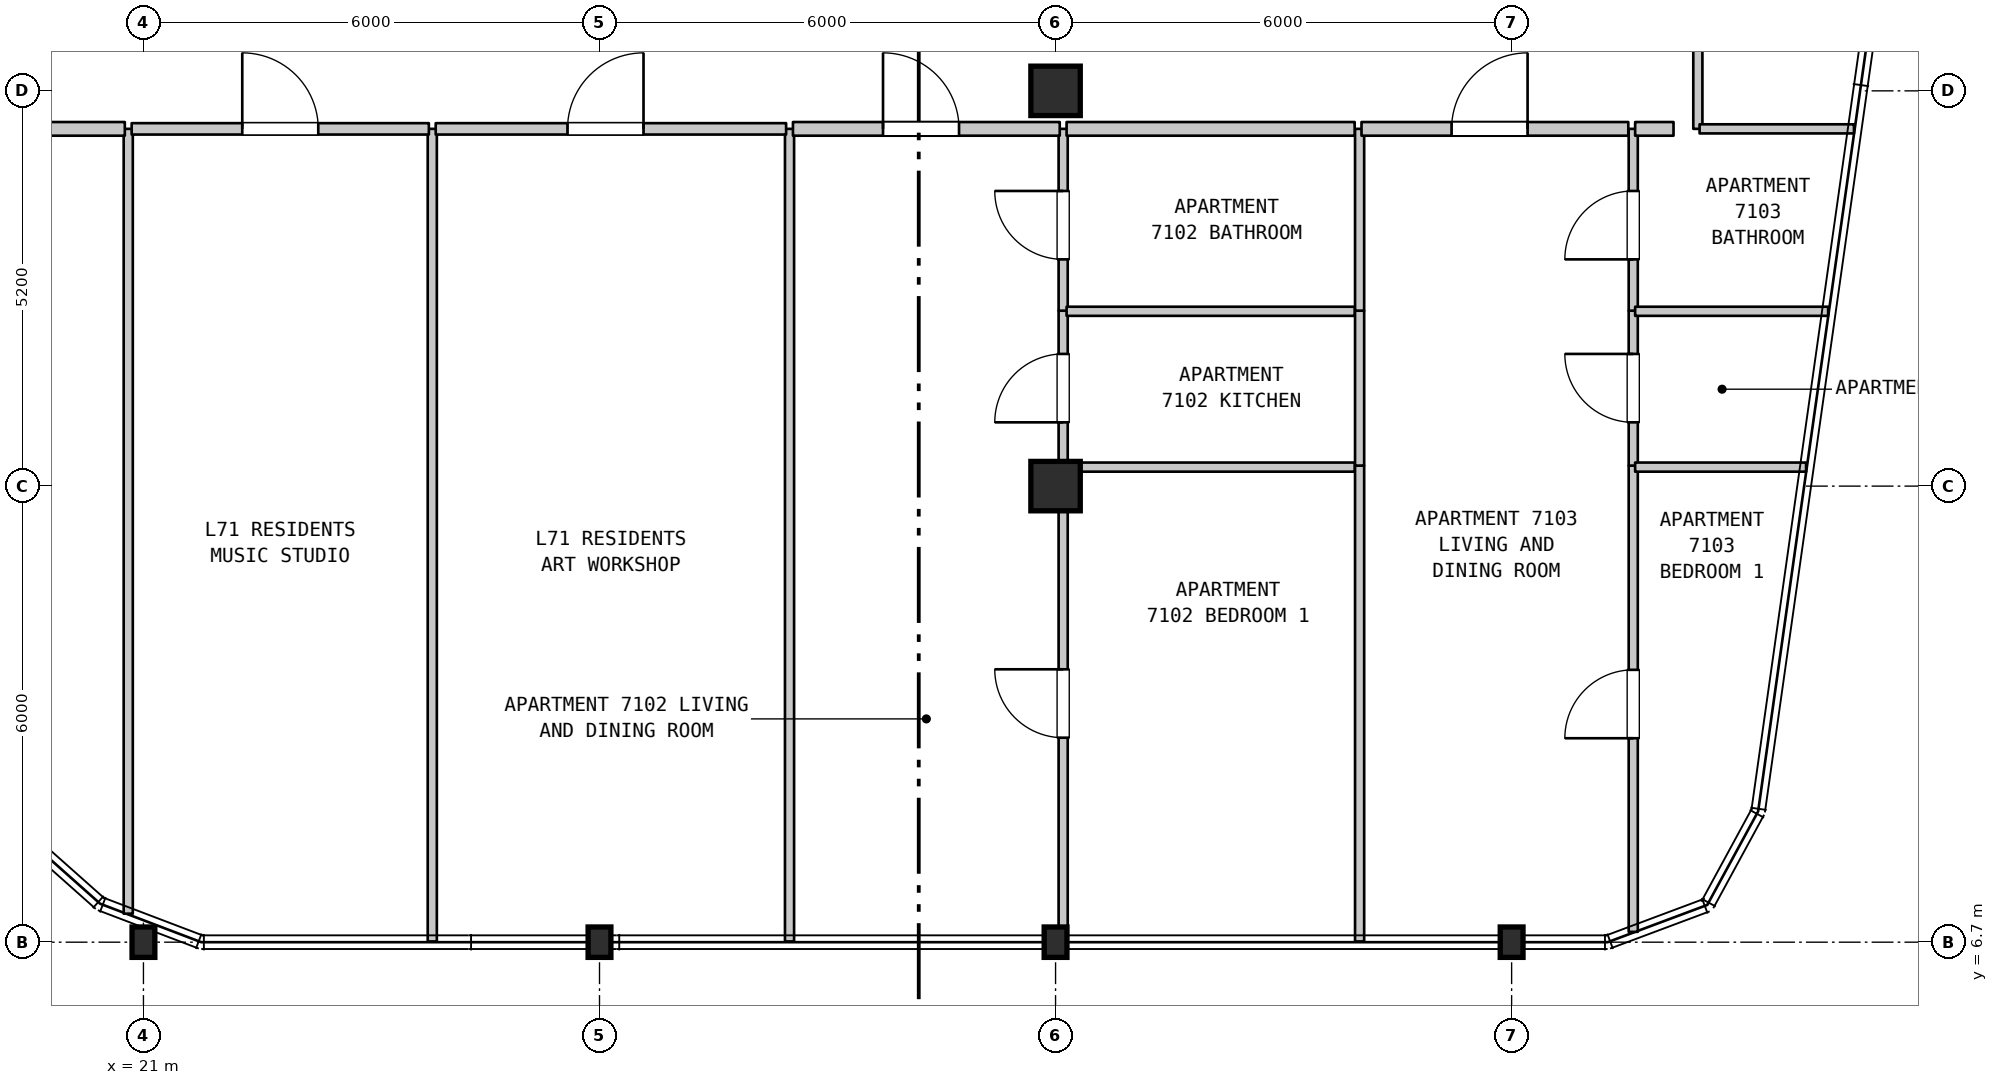
"""IFC4 building model, lengths in metres.
Left out: names, types, materials, properties, quantities, classifications, styles, units other than length and angle.
Written with IfcOpenShell. Run it as: python <this file> out.ifc"""

import sys

from ifc_helpers import new_model, si_unit, direction, frame, frame_2d, origin, origin_2d, place, context, subcontext, project, spatial, rectangle, i_section, extrude, element, fill, save


model = new_model("IFC4")
c1 = context("Model", 3, precision=1e-05, world=origin(), true_north=direction((0.0, 1.0)))
c2 = subcontext(c1, "Body", "Model", "MODEL_VIEW")
j1 = project(units=[si_unit("LENGTHUNIT", "METRE"), si_unit("PLANEANGLEUNIT", "RADIAN")], contexts=[c1])
p1 = place(None, origin())
s1 = spatial("IfcSite", under=j1, at=p1, CompositionType="ELEMENT")
p2 = place(p1, origin())
s2 = spatial("IfcBuilding", under=s1, at=p2, CompositionType="ELEMENT")
p3 = place(p2, frame((0.0, 0.0, 284.3)))
s3 = spatial("IfcBuildingStorey", under=s2, at=p3, CompositionType="ELEMENT", Elevation=284.3)
for number, where, z_axis, x_axis in (
    (1, (21.0, 6.7, 0.0), (0.0, 0.0, 1.0), (1.0, 0.0, 0.0)),
    (2, (27.0, 6.7, 0.0), (0.0, 0.0, 1.0), (1.0, 0.0, 0.0)),
    (3, (33.0, 6.7, 0.0), (0.0, 0.0, 1.0), (1.0, 0.0, 0.0)),
):
    element("IfcColumn", number, at=place(p3, frame(where, z_axis=z_axis, x_axis=x_axis)), inside=s3, PredefinedType="COLUMN", context=c2, shape_type="SweptSolid", body=[
        extrude(i_section(OverallWidth=0.3, OverallDepth=0.4, WebThickness=0.013, FlangeThickness=0.024, FilletRadius=0.027, at=origin_2d()), origin(), (0.0, 0.0, 1.0), 3.7),
    ])
for number, where, z_axis, x_axis in (
    (4, (33.0, 12.7, 0.0), (0.0, 0.0, 1.0), (1.0, 0.0, 0.0)),
    (5, (33.0, 17.9, 0.0), (0.0, 0.0, 1.0), (1.0, 0.0, 0.0)),
):
    element("IfcColumn", number, at=place(p3, frame(where, z_axis=z_axis, x_axis=x_axis)), inside=s3, PredefinedType="COLUMN", context=c2, shape_type="SweptSolid", body=[
        extrude(rectangle(XDim=0.65, YDim=0.65, at=origin_2d()), origin(), (0.0, 0.0, 1.0), 3.7),
    ])
p4 = place(p3, frame((39.0, 6.7, 0.0), z_axis=(0.0, 0.0, 1.0), x_axis=(1.0, 0.0, 0.0)))
e6 = element("IfcColumn", 6, at=p4, inside=s3, PredefinedType="COLUMN", context=c2, shape_type="SweptSolid", body=[
    extrude(i_section(OverallWidth=0.3, OverallDepth=0.4, WebThickness=0.013, FlangeThickness=0.024, FilletRadius=0.027, at=origin_2d()), origin(), (0.0, 0.0, 1.0), 3.7),
])
p5 = place(p3, frame((20.8, 7.075, 0.0), z_axis=(0.0, 0.0, 1.0), x_axis=(0.0, 1.0, 0.0)))
e7 = element("IfcWall", 7, at=p5, inside=s3, PredefinedType="PARTITIONING", context=c2, shape_type="SweptSolid", body=[
    extrude(rectangle(XDim=10.325, YDim=0.12, at=frame_2d((5.163, 0.0))), origin(), (0.0, 0.0, 1.0), 3.39),
])
for number, where, z_axis, x_axis in (
    (8, (24.8, 6.71, 0.0), (0.0, 0.0, 1.0), (0.0, 1.0, 0.0)),
    (9, (29.5, 6.71, 0.0), (0.0, 0.0, 1.0), (0.0, 1.0, 0.0)),
):
    element("IfcWall", number, at=place(p3, frame(where, z_axis=z_axis, x_axis=x_axis)), inside=s3, PredefinedType="PARTITIONING", context=c2, shape_type="SweptSolid", body=[
        extrude(rectangle(XDim=10.69, YDim=0.12, at=frame_2d((5.345, 0.0))), origin(), (0.0, 0.0, 1.0), 3.39),
    ])
p6 = place(p3, frame((33.1, 6.71, 0.0), z_axis=(0.0, 0.0, 1.0), x_axis=(0.0, 1.0, 0.0)))
e10 = element("IfcWall", 10, at=p6, inside=s3, PredefinedType="PARTITIONING", context=c2, shape_type="SweptSolid", body=[
    extrude(rectangle(XDim=6.26, YDim=0.12, at=frame_2d((3.13, 0.0))), origin(), (0.0, 0.0, 1.0), 3.1),
])
p7 = place(p6, frame((2.68, 0.0, 0.0)))
e11 = element("IfcOpeningElement", 11, at=p7, cuts=e10, PredefinedType="OPENING", context=c2, shape_type="SweptSolid", body=[
    extrude(rectangle(XDim=0.9, YDim=2.15, at=frame_2d((0.45, 1.075))), frame((0.0, 0.07, 0.0), z_axis=(0.0, -1.0, 0.0), x_axis=(1.0, 0.0, 0.0)), (0.0, 0.0, 1.0), 0.14),
])
p8 = place(p3, frame((33.1, 12.97, 0.0), z_axis=(0.0, 0.0, 1.0), x_axis=(0.0, 1.0, 0.0)))
e12 = element("IfcWall", 12, at=p8, inside=s3, PredefinedType="PARTITIONING", context=c2, shape_type="SweptSolid", body=[
    extrude(rectangle(XDim=2.038, YDim=0.12, at=frame_2d((1.019, 0.0))), origin(), (0.0, 0.0, 1.0), 3.1),
])
p9 = place(p8, frame((0.569, 0.0, 0.0)))
e13 = element("IfcOpeningElement", 13, at=p9, cuts=e12, PredefinedType="OPENING", context=c2, shape_type="SweptSolid", body=[
    extrude(rectangle(XDim=0.9, YDim=2.15, at=frame_2d((0.45, 1.075))), frame((0.0, 0.07, 0.0), z_axis=(0.0, -1.0, 0.0), x_axis=(1.0, 0.0, 0.0)), (0.0, 0.0, 1.0), 0.14),
])
p10 = place(p3, frame((33.1, 15.008, 0.0), z_axis=(0.0, 0.0, 1.0), x_axis=(0.0, 1.0, 0.0)))
e14 = element("IfcWall", 14, at=p10, inside=s3, PredefinedType="PARTITIONING", context=c2, shape_type="SweptSolid", body=[
    extrude(rectangle(XDim=2.392, YDim=0.12, at=frame_2d((1.196, 0.0))), origin(), (0.0, 0.0, 1.0), 3.1),
])
p11 = place(p10, frame((0.675, 0.0, 0.0)))
e15 = element("IfcOpeningElement", 15, at=p11, cuts=e14, PredefinedType="OPENING", context=c2, shape_type="SweptSolid", body=[
    extrude(rectangle(XDim=0.9, YDim=2.1, at=frame_2d((0.45, 1.05))), frame((0.0, 0.07, 0.0), z_axis=(0.0, -1.0, 0.0), x_axis=(1.0, 0.0, 0.0)), (0.0, 0.0, 1.0), 0.14),
])
p12 = place(p3, frame((37.0, 6.71, 0.0), z_axis=(0.0, 0.0, 1.0), x_axis=(0.0, 1.0, 0.0)))
e16 = element("IfcWall", 16, at=p12, inside=s3, PredefinedType="PARTITIONING", context=c2, shape_type="SweptSolid", body=[
    extrude(rectangle(XDim=6.26, YDim=0.12, at=frame_2d((3.13, 0.0))), origin(), (0.0, 0.0, 1.0), 3.39),
])
p13 = place(p3, frame((37.0, 12.97, 0.0), z_axis=(0.0, 0.0, 1.0), x_axis=(0.0, 1.0, 0.0)))
e17 = element("IfcWall", 17, at=p13, inside=s3, PredefinedType="PARTITIONING", context=c2, shape_type="SweptSolid", body=[
    extrude(rectangle(XDim=2.038, YDim=0.12, at=frame_2d((1.019, 0.0))), origin(), (0.0, 0.0, 1.0), 3.39),
])
p14 = place(p3, frame((37.0, 15.008, 0.0), z_axis=(0.0, 0.0, 1.0), x_axis=(0.0, 1.0, 0.0)))
e18 = element("IfcWall", 18, at=p14, inside=s3, PredefinedType="PARTITIONING", context=c2, shape_type="SweptSolid", body=[
    extrude(rectangle(XDim=2.392, YDim=0.12, at=frame_2d((1.196, 0.0))), origin(), (0.0, 0.0, 1.0), 3.39),
])
p15 = place(p3, frame((40.6, 6.836, 0.0), z_axis=(0.0, 0.0, 1.0), x_axis=(0.0, 1.0, 0.0)))
e19 = element("IfcWall", 19, at=p15, inside=s3, PredefinedType="PARTITIONING", context=c2, shape_type="SweptSolid", body=[
    extrude(rectangle(XDim=6.134, YDim=0.12, at=frame_2d((3.067, 0.0))), origin(), (0.0, 0.0, 1.0), 3.39),
])
p16 = place(p15, frame((2.547, 0.0, 0.0)))
e20 = element("IfcOpeningElement", 20, at=p16, cuts=e19, PredefinedType="OPENING", context=c2, shape_type="SweptSolid", body=[
    extrude(rectangle(XDim=0.9, YDim=2.15, at=frame_2d((0.45, 1.075))), frame((0.0, 0.07, 0.0), z_axis=(0.0, -1.0, 0.0), x_axis=(1.0, 0.0, 0.0)), (0.0, 0.0, 1.0), 0.14),
])
p17 = place(p3, frame((40.6, 12.97, 0.0), z_axis=(0.0, 0.0, 1.0), x_axis=(0.0, 1.0, 0.0)))
e21 = element("IfcWall", 21, at=p17, inside=s3, PredefinedType="PARTITIONING", context=c2, shape_type="SweptSolid", body=[
    extrude(rectangle(XDim=2.038, YDim=0.12, at=frame_2d((1.019, 0.0))), origin(), (0.0, 0.0, 1.0), 3.39),
])
p18 = place(p17, frame((0.569, 0.0, 0.0)))
e22 = element("IfcOpeningElement", 22, at=p18, cuts=e21, PredefinedType="OPENING", context=c2, shape_type="SweptSolid", body=[
    extrude(rectangle(XDim=0.9, YDim=2.15, at=frame_2d((0.45, 1.075))), frame((0.0, 0.07, 0.0), z_axis=(0.0, -1.0, 0.0), x_axis=(1.0, 0.0, 0.0)), (0.0, 0.0, 1.0), 0.14),
])
p19 = place(p3, frame((40.6, 15.008, 0.0), z_axis=(0.0, 0.0, 1.0), x_axis=(0.0, 1.0, 0.0)))
e23 = element("IfcWall", 23, at=p19, inside=s3, PredefinedType="PARTITIONING", context=c2, shape_type="SweptSolid", body=[
    extrude(rectangle(XDim=2.392, YDim=0.12, at=frame_2d((1.196, 0.0))), origin(), (0.0, 0.0, 1.0), 3.39),
])
p20 = place(p19, frame((0.675, 0.0, 0.0)))
e24 = element("IfcOpeningElement", 24, at=p20, cuts=e23, PredefinedType="OPENING", context=c2, shape_type="SweptSolid", body=[
    extrude(rectangle(XDim=0.9, YDim=2.1, at=frame_2d((0.45, 1.05))), frame((0.0, 0.07, 0.0), z_axis=(0.0, -1.0, 0.0), x_axis=(1.0, 0.0, 0.0)), (0.0, 0.0, 1.0), 0.14),
])
p21 = place(p3, frame((41.45, 17.4, 0.0), z_axis=(0.0, 0.0, 1.0), x_axis=(0.0, 1.0, 0.0)))
e25 = element("IfcWall", 25, at=p21, inside=s3, PredefinedType="PARTITIONING", context=c2, shape_type="SweptSolid", body=[
    extrude(rectangle(XDim=2.099, YDim=0.12, at=frame_2d((1.05, 0.0))), origin(), (0.0, 0.0, 1.0), 3.39),
])
p22 = place(p3, frame((33.145, 12.95, 0.0), z_axis=(0.0, 0.0, 1.0), x_axis=(1.0, 0.0, 0.0)))
e26 = element("IfcWall", 26, at=p22, inside=s3, PredefinedType="PARTITIONING", context=c2, shape_type="SweptSolid", body=[
    extrude(rectangle(XDim=3.79, YDim=0.12, at=frame_2d((1.895, 0.0))), origin(), (0.0, 0.0, 1.0), 3.39),
])
p23 = place(p3, frame((40.625, 12.95, 0.0), z_axis=(0.0, 0.0, 1.0), x_axis=(1.0, 0.0, 0.0)))
e27 = element("IfcWall", 27, at=p23, inside=s3, PredefinedType="PARTITIONING", context=c2, shape_type="SweptSolid", body=[
    extrude(rectangle(XDim=2.249, YDim=0.12, at=frame_2d((1.125, 0.0))), origin(), (0.0, 0.0, 1.0), 3.39),
])
p24 = place(p3, frame((33.145, 15.0, 0.0), z_axis=(0.0, 0.0, 1.0), x_axis=(1.0, 0.0, 0.0)))
e28 = element("IfcWall", 28, at=p24, inside=s3, PredefinedType="PARTITIONING", context=c2, shape_type="SweptSolid", body=[
    extrude(rectangle(XDim=3.79, YDim=0.12, at=frame_2d((1.895, 0.0))), origin(), (0.0, 0.0, 1.0), 3.39),
])
p25 = place(p3, frame((40.625, 15.0, 0.0), z_axis=(0.0, 0.0, 1.0), x_axis=(1.0, 0.0, 0.0)))
e29 = element("IfcWall", 29, at=p25, inside=s3, PredefinedType="PARTITIONING", context=c2, shape_type="SweptSolid", body=[
    extrude(rectangle(XDim=2.539, YDim=0.12, at=frame_2d((1.27, 0.0))), origin(), (0.0, 0.0, 1.0), 3.39),
])
p26 = place(p3, frame((18.895, 17.4, 0.0), z_axis=(0.0, 0.0, 1.0), x_axis=(1.0, 0.0, 0.0)))
e30 = element("IfcWall", 30, at=p26, inside=s3, PredefinedType="STANDARD", context=c2, shape_type="SweptSolid", body=[
    extrude(rectangle(XDim=1.86, YDim=0.18, at=frame_2d((0.93, 0.0))), origin(), (0.0, 0.0, 1.0), 3.39),
])
p27 = place(p3, frame((20.845, 17.4, 0.0), z_axis=(0.0, 0.0, 1.0), x_axis=(1.0, 0.0, 0.0)))
e31 = element("IfcWall", 31, at=p27, inside=s3, PredefinedType="STANDARD", context=c2, shape_type="SweptSolid", body=[
    extrude(rectangle(XDim=3.91, YDim=0.15, at=frame_2d((1.955, 0.0))), origin(), (0.0, 0.0, 1.0), 3.39),
])
p28 = place(p27, frame((1.455, 0.0, 0.0)))
e32 = element("IfcOpeningElement", 32, at=p28, cuts=e31, PredefinedType="OPENING", context=c2, shape_type="SweptSolid", body=[
    extrude(rectangle(XDim=1.0, YDim=2.15, at=frame_2d((0.5, 1.075))), frame((0.0, 0.085, 0.0), z_axis=(0.0, -1.0, 0.0), x_axis=(1.0, 0.0, 0.0)), (0.0, 0.0, 1.0), 0.17),
])
p29 = place(p3, frame((24.845, 17.4, 0.0), z_axis=(0.0, 0.0, 1.0), x_axis=(1.0, 0.0, 0.0)))
e33 = element("IfcWall", 33, at=p29, inside=s3, PredefinedType="STANDARD", context=c2, shape_type="SweptSolid", body=[
    extrude(rectangle(XDim=4.61, YDim=0.15, at=frame_2d((2.305, 0.0))), origin(), (0.0, 0.0, 1.0), 3.39),
])
p30 = place(p29, frame((1.734, 0.0, 0.0)))
e34 = element("IfcOpeningElement", 34, at=p30, cuts=e33, PredefinedType="OPENING", context=c2, shape_type="SweptSolid", body=[
    extrude(rectangle(XDim=1.0, YDim=2.15, at=frame_2d((0.5, 1.075))), frame((0.0, 0.085, 0.0), z_axis=(0.0, -1.0, 0.0), x_axis=(1.0, 0.0, 0.0)), (0.0, 0.0, 1.0), 0.17),
])
p31 = place(p3, frame((29.545, 17.4, 0.0), z_axis=(0.0, 0.0, 1.0), x_axis=(1.0, 0.0, 0.0)))
e35 = element("IfcWall", 35, at=p31, inside=s3, PredefinedType="STANDARD", context=c2, shape_type="SweptSolid", body=[
    extrude(rectangle(XDim=3.51, YDim=0.18, at=frame_2d((1.755, 0.0))), origin(), (0.0, 0.0, 1.0), 3.39),
])
p32 = place(p31, frame((1.185, 0.0, 0.0)))
e36 = element("IfcOpeningElement", 36, at=p32, cuts=e35, PredefinedType="OPENING", context=c2, shape_type="SweptSolid", body=[
    extrude(rectangle(XDim=1.0, YDim=2.15, at=frame_2d((0.5, 1.075))), frame((0.0, 0.1, 0.0), z_axis=(0.0, -1.0, 0.0), x_axis=(1.0, 0.0, 0.0)), (0.0, 0.0, 1.0), 0.2),
])
p33 = place(p3, frame((33.145, 17.4, 0.0), z_axis=(0.0, 0.0, 1.0), x_axis=(1.0, 0.0, 0.0)))
e37 = element("IfcWall", 37, at=p33, inside=s3, PredefinedType="STANDARD", context=c2, shape_type="SweptSolid", body=[
    extrude(rectangle(XDim=3.79, YDim=0.18, at=frame_2d((1.895, 0.0))), origin(), (0.0, 0.0, 1.0), 3.39),
])
p34 = place(p3, frame((37.025, 17.4, 0.0), z_axis=(0.0, 0.0, 1.0), x_axis=(1.0, 0.0, 0.0)))
e38 = element("IfcWall", 38, at=p34, inside=s3, PredefinedType="STANDARD", context=c2, shape_type="SweptSolid", body=[
    extrude(rectangle(XDim=3.51, YDim=0.18, at=frame_2d((1.755, 0.0))), origin(), (0.0, 0.0, 1.0), 3.39),
])
p35 = place(p34, frame((1.185, 0.0, 0.0)))
e39 = element("IfcOpeningElement", 39, at=p35, cuts=e38, PredefinedType="OPENING", context=c2, shape_type="SweptSolid", body=[
    extrude(rectangle(XDim=1.0, YDim=2.15, at=frame_2d((0.5, 1.075))), frame((0.0, 0.1, 0.0), z_axis=(0.0, -1.0, 0.0), x_axis=(1.0, 0.0, 0.0)), (0.0, 0.0, 1.0), 0.2),
])
p36 = place(p3, frame((40.625, 17.4, 0.0), z_axis=(0.0, 0.0, 1.0), x_axis=(1.0, 0.0, 0.0)))
e40 = element("IfcWall", 40, at=p36, inside=s3, PredefinedType="STANDARD", context=c2, shape_type="SweptSolid", body=[
    extrude(rectangle(XDim=0.505, YDim=0.18, at=frame_2d((0.252, 0.0))), origin(), (0.0, 0.0, 1.0), 3.39),
])
p37 = place(p3, frame((41.473, 17.4, 0.0), z_axis=(0.0, 0.0, 1.0), x_axis=(1.0, 0.0, 0.0)))
e41 = element("IfcWall", 41, at=p37, inside=s3, PredefinedType="PARTITIONING", context=c2, shape_type="SweptSolid", body=[
    extrude(rectangle(XDim=2.031, YDim=0.12, at=frame_2d((1.016, 0.0))), origin(), (0.0, 0.0, 1.0), 3.39),
])
p38 = place(p7, origin())
e42 = element("IfcDoor", 42, at=p38, inside=s3, OperationType="SINGLE_SWING_RIGHT", PredefinedType="DOOR", context=c2, shape_type="SweptSolid", body=[
    extrude(rectangle(XDim=0.9, YDim=2.15, at=frame_2d((0.45, 1.075))), frame((0.0, 0.025, 0.0), z_axis=(0.0, -1.0, 0.0), x_axis=(1.0, 0.0, 0.0)), (0.0, 0.0, 1.0), 0.05),
])
fill(e11, e42)
p39 = place(p9, origin())
e43 = element("IfcDoor", 43, at=p39, inside=s3, OperationType="SINGLE_SWING_LEFT", PredefinedType="DOOR", context=c2, shape_type="SweptSolid", body=[
    extrude(rectangle(XDim=0.9, YDim=2.15, at=frame_2d((0.45, 1.075))), frame((0.0, 0.025, 0.0), z_axis=(0.0, -1.0, 0.0), x_axis=(1.0, 0.0, 0.0)), (0.0, 0.0, 1.0), 0.05),
])
fill(e13, e43)
p40 = place(p11, origin())
e44 = element("IfcDoor", 44, at=p40, inside=s3, OperationType="SINGLE_SWING_RIGHT", PredefinedType="DOOR", context=c2, shape_type="SweptSolid", body=[
    extrude(rectangle(XDim=0.9, YDim=2.1, at=frame_2d((0.45, 1.05))), frame((0.0, 0.025, 0.0), z_axis=(0.0, -1.0, 0.0), x_axis=(1.0, 0.0, 0.0)), (0.0, 0.0, 1.0), 0.05),
])
fill(e15, e44)
p41 = place(p16, origin())
e45 = element("IfcDoor", 45, at=p41, inside=s3, OperationType="SINGLE_SWING_LEFT", PredefinedType="DOOR", context=c2, shape_type="SweptSolid", body=[
    extrude(rectangle(XDim=0.9, YDim=2.15, at=frame_2d((0.45, 1.075))), frame((0.0, 0.025, 0.0), z_axis=(0.0, -1.0, 0.0), x_axis=(1.0, 0.0, 0.0)), (0.0, 0.0, 1.0), 0.05),
])
fill(e20, e45)
p42 = place(p18, origin())
e46 = element("IfcDoor", 46, at=p42, inside=s3, OperationType="SINGLE_SWING_RIGHT", PredefinedType="DOOR", context=c2, shape_type="SweptSolid", body=[
    extrude(rectangle(XDim=0.9, YDim=2.15, at=frame_2d((0.45, 1.075))), frame((0.0, 0.025, 0.0), z_axis=(0.0, -1.0, 0.0), x_axis=(1.0, 0.0, 0.0)), (0.0, 0.0, 1.0), 0.05),
])
fill(e22, e46)
p43 = place(p20, origin())
e47 = element("IfcDoor", 47, at=p43, inside=s3, OperationType="SINGLE_SWING_LEFT", PredefinedType="DOOR", context=c2, shape_type="SweptSolid", body=[
    extrude(rectangle(XDim=0.9, YDim=2.1, at=frame_2d((0.45, 1.05))), frame((0.0, 0.025, 0.0), z_axis=(0.0, -1.0, 0.0), x_axis=(1.0, 0.0, 0.0)), (0.0, 0.0, 1.0), 0.05),
])
fill(e24, e47)
p44 = place(p28, origin())
e48 = element("IfcDoor", 48, at=p44, inside=s3, OperationType="SINGLE_SWING_LEFT", PredefinedType="DOOR", context=c2, shape_type="SweptSolid", body=[
    extrude(rectangle(XDim=1.0, YDim=2.15, at=frame_2d((0.5, 1.075))), frame((0.0, 0.025, 0.0), z_axis=(0.0, -1.0, 0.0), x_axis=(1.0, 0.0, 0.0)), (0.0, 0.0, 1.0), 0.05),
])
fill(e32, e48)
p45 = place(p30, origin())
e49 = element("IfcDoor", 49, at=p45, inside=s3, OperationType="SINGLE_SWING_RIGHT", PredefinedType="DOOR", context=c2, shape_type="SweptSolid", body=[
    extrude(rectangle(XDim=1.0, YDim=2.15, at=frame_2d((0.5, 1.075))), frame((0.0, 0.025, 0.0), z_axis=(0.0, -1.0, 0.0), x_axis=(1.0, 0.0, 0.0)), (0.0, 0.0, 1.0), 0.05),
])
fill(e34, e49)
p46 = place(p32, origin())
e50 = element("IfcDoor", 50, at=p46, inside=s3, OperationType="SINGLE_SWING_LEFT", PredefinedType="DOOR", context=c2, shape_type="SweptSolid", body=[
    extrude(rectangle(XDim=1.0, YDim=2.15, at=frame_2d((0.5, 1.075))), frame((0.0, 0.025, 0.0), z_axis=(0.0, -1.0, 0.0), x_axis=(1.0, 0.0, 0.0)), (0.0, 0.0, 1.0), 0.05),
])
fill(e36, e50)
p47 = place(p35, origin())
e51 = element("IfcDoor", 51, at=p47, inside=s3, OperationType="SINGLE_SWING_RIGHT", PredefinedType="DOOR", context=c2, shape_type="SweptSolid", body=[
    extrude(rectangle(XDim=1.0, YDim=2.15, at=frame_2d((0.5, 1.075))), frame((0.0, 0.025, 0.0), z_axis=(0.0, -1.0, 0.0), x_axis=(1.0, 0.0, 0.0)), (0.0, 0.0, 1.0), 0.05),
])
fill(e39, e51)
save(model, sys.argv[1])
